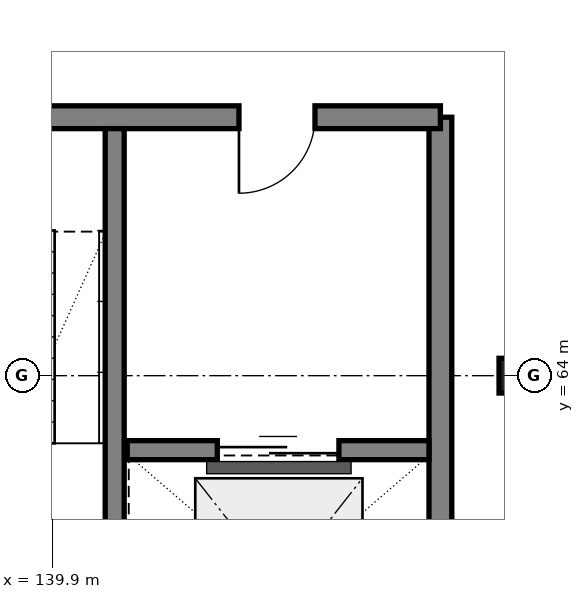
"""IFC4 building model, lengths in metres.
Left out: names, types, materials, properties, quantities, classifications, styles, units other than length and angle.
Written with IfcOpenShell. Run it as: python <this file> out.ifc"""

import sys

from ifc_helpers import new_model, si_unit, direction, frame, frame_2d, origin, origin_2d_with_axis, place, context, subcontext, project, spatial, rectangle, hollow_circle, extrude, element, fill, save


model = new_model("IFC4")
c1 = context("Model", 3, precision=1e-05, world=origin(), true_north=direction((0.0, 1.0)))
c2 = subcontext(c1, "Body", "Model", "MODEL_VIEW")
j1 = project(units=[si_unit("LENGTHUNIT", "METRE"), si_unit("PLANEANGLEUNIT", "RADIAN")], contexts=[c1])
p1 = place(None, origin())
s1 = spatial("IfcSite", under=j1, at=p1, CompositionType="ELEMENT")
p2 = place(p1, origin())
s2 = spatial("IfcBuilding", under=s1, at=p2, CompositionType="ELEMENT")
p3 = place(p2, frame((0.0, 0.0, 4.5)))
s3 = spatial("IfcBuildingStorey", under=s2, at=p3, CompositionType="ELEMENT", Elevation=4.5)
p4 = place(p3, frame((146.0, 64.0, 0.0), z_axis=(0.0, 0.0, 1.0), x_axis=(1.0, 0.0, 0.0)))
e1 = element("IfcColumn", 1, at=p4, inside=s3, PredefinedType="COLUMN", context=c2, shape_type="SweptSolid", body=[
    extrude(hollow_circle(Radius=0.229, WallThickness=0.013, at=origin_2d_with_axis()), origin(), (0.0, 0.0, 1.0), 3.9),
])
p5 = place(p3, frame((145.0, 59.4, 0.0), z_axis=(0.0, 0.0, 1.0), x_axis=(0.0, 1.0, 0.0)))
e2 = element("IfcWall", 2, at=p5, inside=s3, PredefinedType="SHEAR", context=c2, shape_type="SweptSolid", body=[
    extrude(rectangle(XDim=8.0, YDim=0.3, at=frame_2d((4.0, 0.0), x_axis=(1.0, 0.0))), origin(), (0.0, 0.0, 1.0), 3.9),
])
p6 = place(p3, frame((145.0, 67.4, 0.0), z_axis=(0.0, 0.0, 1.0), x_axis=(-1.0, 0.0, 0.0)))
e3 = element("IfcWall", 3, at=p6, inside=s3, PredefinedType="SHEAR", context=c2, shape_type="SweptSolid", body=[
    extrude(rectangle(XDim=7.4, YDim=0.3, at=frame_2d((3.7, 0.0), x_axis=(1.0, 0.0))), origin(), (0.0, 0.0, 1.0), 3.9),
])
p7 = place(p6, frame((1.65, 0.0, 0.0)))
e4 = element("IfcOpeningElement", 4, at=p7, cuts=e3, PredefinedType="OPENING", context=c2, shape_type="SweptSolid", body=[
    extrude(rectangle(XDim=1.0, YDim=2.15, at=frame_2d((0.5, 1.075), x_axis=(1.0, 0.0))), frame((0.0, 0.16, 0.0), z_axis=(0.0, -1.0, 0.0), x_axis=(1.0, 0.0, 0.0)), (0.0, 0.0, 1.0), 0.32),
])
p8 = place(p6, frame((5.3, 0.0, 0.0)))
e5 = element("IfcOpeningElement", 5, at=p8, cuts=e3, PredefinedType="OPENING", context=c2, shape_type="SweptSolid", body=[
    extrude(rectangle(XDim=1.0, YDim=2.15, at=frame_2d((0.5, 1.075), x_axis=(1.0, 0.0))), frame((0.0, 0.16, 0.0), z_axis=(0.0, -1.0, 0.0), x_axis=(1.0, 0.0, 0.0)), (0.0, 0.0, 1.0), 0.32),
])
p9 = place(p3, frame((140.715, 59.55, 0.0), z_axis=(0.0, 0.0, 1.0), x_axis=(0.0, 1.0, 0.0)))
e6 = element("IfcWall", 6, at=p9, inside=s3, PredefinedType="SHEAR", context=c2, shape_type="SweptSolid", body=[
    extrude(rectangle(XDim=7.7, YDim=0.25, at=frame_2d((3.85, 0.0), x_axis=(1.0, 0.0))), origin(), (0.0, 0.0, 1.0), 3.9),
])
p10 = place(p3, frame((140.88, 63.02, 0.0), z_axis=(0.0, 0.0, 1.0), x_axis=(1.0, 0.0, 0.0)))
e7 = element("IfcWall", 7, at=p10, inside=s3, PredefinedType="SHEAR", context=c2, shape_type="SweptSolid", body=[
    extrude(rectangle(XDim=3.97, YDim=0.25, at=frame_2d((1.985, 0.0), x_axis=(1.0, 0.0))), origin(), (0.0, 0.0, 1.0), 3.65),
])
p11 = place(p10, frame((1.185, 0.0, 0.0)))
e8 = element("IfcOpeningElement", 8, at=p11, cuts=e7, PredefinedType="OPENING", context=c2, shape_type="SweptSolid", body=[
    extrude(rectangle(XDim=1.6, YDim=2.3, at=frame_2d((0.8, 1.15), x_axis=(1.0, 0.0))), frame((0.0, 0.135, 0.0), z_axis=(0.0, -1.0, 0.0), x_axis=(1.0, 0.0, 0.0)), (0.0, 0.0, 1.0), 0.27),
])
p12 = place(p7, origin())
e9 = element("IfcDoor", 9, at=p12, inside=s3, OperationType="SINGLE_SWING_RIGHT", PredefinedType="DOOR", context=c2, shape_type="SweptSolid", body=[
    extrude(rectangle(XDim=1.0, YDim=2.15, at=frame_2d((0.5, 1.075), x_axis=(1.0, 0.0))), frame((0.0, 0.025, 0.0), z_axis=(0.0, -1.0, 0.0), x_axis=(1.0, 0.0, 0.0)), (0.0, 0.0, 1.0), 0.05),
])
fill(e4, e9)
p13 = place(p11, origin())
e10 = element("IfcDoor", 10, at=p13, inside=s3, OperationType="SLIDING_TO_RIGHT", PredefinedType="DOOR", context=c2, shape_type="SweptSolid", body=[
    extrude(rectangle(XDim=1.6, YDim=2.3, at=frame_2d((0.8, 1.15), x_axis=(1.0, 0.0))), frame((0.0, 0.025, 0.0), z_axis=(0.0, -1.0, 0.0), x_axis=(1.0, 0.0, 0.0)), (0.0, 0.0, 1.0), 0.05),
])
fill(e8, e10)
save(model, sys.argv[1])
